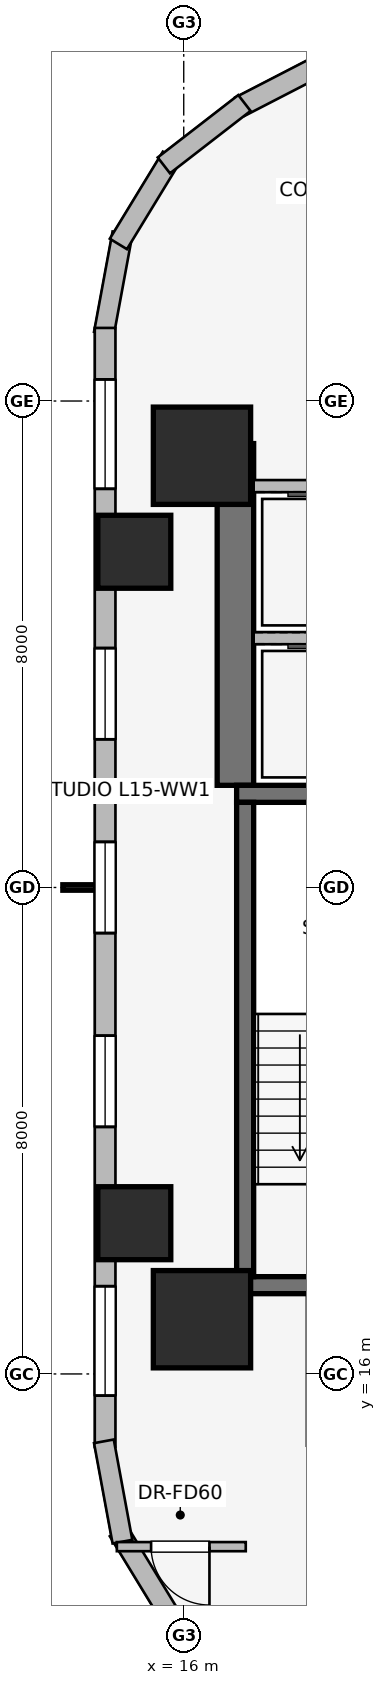
"""IFC4 building model, lengths in metres.
Left out: names, types, materials, properties, quantities, classifications, styles, units other than length and angle.
Written with IfcOpenShell. Run it as: python <this file> out.ifc"""

import sys

from ifc_helpers import new_model, si_unit, direction, frame, frame_2d, origin, origin_2d, place, context, subcontext, project, spatial, rectangle, extrude, element, fill, save


model = new_model("IFC4")
c1 = context("Model", 3, precision=1e-05, world=origin(), true_north=direction((0.0, 1.0)))
c2 = subcontext(c1, "Body", "Model", "MODEL_VIEW")
j1 = project(units=[si_unit("LENGTHUNIT", "METRE"), si_unit("PLANEANGLEUNIT", "RADIAN")], contexts=[c1])
p1 = place(None, origin())
s1 = spatial("IfcSite", under=j1, at=p1, CompositionType="ELEMENT")
p2 = place(p1, origin())
s2 = spatial("IfcBuilding", under=s1, at=p2, CompositionType="ELEMENT")
p3 = place(p2, frame((0.0, 0.0, 59.85)))
s3 = spatial("IfcBuildingStorey", under=s2, at=p3, CompositionType="ELEMENT", Elevation=59.85)
p4 = place(p3, frame((16.85, 25.68, 0.0), z_axis=(0.0, 0.0, 1.0), x_axis=(0.0, 1.0, 0.0)))
e1 = element("IfcWall", 1, at=p4, inside=s3, PredefinedType="SHEAR", context=c2, shape_type="SweptSolid", body=[
    extrude(rectangle(XDim=5.62, YDim=0.6, at=frame_2d((2.81, 0.0))), origin(), (0.0, 0.0, 1.0), 3.65),
])
for number, where, z_axis, x_axis in (
    (2, (16.87, 17.46, 0.0), (0.0, 0.0, 1.0), (1.0, 0.0, 0.0)),
    (3, (20.63, 25.54, 0.0), (0.0, 0.0, 1.0), (-1.0, 0.0, 0.0)),
):
    element("IfcWall", number, at=place(p3, frame(where, z_axis=z_axis, x_axis=x_axis)), inside=s3, PredefinedType="SHEAR", context=c2, shape_type="SweptSolid", body=[
        extrude(rectangle(XDim=3.76, YDim=0.28, at=frame_2d((1.88, 0.0))), origin(), (0.0, 0.0, 1.0), 3.65),
    ])
p5 = place(p3, frame((17.01, 25.4, 0.0), z_axis=(0.0, 0.0, 1.0), x_axis=(0.0, -1.0, 0.0)))
e4 = element("IfcWall", 4, at=p5, inside=s3, PredefinedType="SHEAR", context=c2, shape_type="SweptSolid", body=[
    extrude(rectangle(XDim=7.8, YDim=0.28, at=frame_2d((3.9, 0.0))), origin(), (0.0, 0.0, 1.0), 3.65),
])
for number, where, z_axis, x_axis in (
    (5, (16.3, 16.9, 0.0), (0.0, 0.0, 1.0), (1.0, 0.0, 0.0)),
    (6, (16.3, 31.1, 0.0), (0.0, 0.0, 1.0), (1.0, 0.0, 0.0)),
):
    element("IfcColumn", number, at=place(p3, frame(where, z_axis=z_axis, x_axis=x_axis)), inside=s3, PredefinedType="COLUMN", context=c2, shape_type="SweptSolid", body=[
        extrude(rectangle(XDim=1.6, YDim=1.6, at=origin_2d()), origin(), (0.0, 0.0, 1.0), 3.65),
    ])
for number, where, z_axis, x_axis in (
    (7, (15.187, 29.521, 0.0), (0.0, 0.0, 1.0), (1.0, 0.0, 0.0)),
    (8, (15.187, 18.479, 0.0), (0.0, 0.0, 1.0), (1.0, 0.0, 0.0)),
):
    element("IfcColumn", number, at=place(p3, frame(where, z_axis=z_axis, x_axis=x_axis)), inside=s3, PredefinedType="COLUMN", context=c2, shape_type="SweptSolid", body=[
        extrude(rectangle(XDim=1.2, YDim=1.2, at=origin_2d()), origin(), (0.0, 0.0, 1.0), 3.65),
    ])
p6 = place(p3, frame((16.924, 36.841, 0.0), z_axis=(0.0, 0.0, 1.0), x_axis=(0.888634413993, 0.458616264721, 0.0)))
e9 = element("IfcWall", 9, at=p6, inside=s3, PredefinedType="STANDARD", context=c2, shape_type="SweptSolid", body=[
    extrude(rectangle(XDim=20.531, YDim=0.34, at=frame_2d((10.266, 0.0))), origin(), (0.0, 0.0, 1.0), 2.684),
])
p7 = place(p6, frame((2.161, 0.0, 0.75)))
e10 = element("IfcOpeningElement", 10, at=p7, cuts=e9, PredefinedType="OPENING", context=c2, shape_type="SweptSolid", body=[
    extrude(rectangle(XDim=1.05, YDim=1.4, at=frame_2d((0.525, 0.7))), frame((0.0, 0.18, 0.0), z_axis=(0.0, -1.0, 0.0), x_axis=(1.0, 0.0, 0.0)), (0.0, 0.0, 1.0), 0.36),
])
p8 = place(p6, frame((5.903, 0.0, 0.75)))
e11 = element("IfcOpeningElement", 11, at=p8, cuts=e9, PredefinedType="OPENING", context=c2, shape_type="SweptSolid", body=[
    extrude(rectangle(XDim=1.5, YDim=1.5, at=frame_2d((0.75, 0.75))), frame((0.0, 0.18, 0.0), z_axis=(0.0, -1.0, 0.0), x_axis=(1.0, 0.0, 0.0)), (0.0, 0.0, 1.0), 0.36),
])
p9 = place(p6, frame((9.516, 0.0, 0.75)))
e12 = element("IfcOpeningElement", 12, at=p9, cuts=e9, PredefinedType="OPENING", context=c2, shape_type="SweptSolid", body=[
    extrude(rectangle(XDim=1.5, YDim=1.5, at=frame_2d((0.75, 0.75))), frame((0.0, 0.18, 0.0), z_axis=(0.0, -1.0, 0.0), x_axis=(1.0, 0.0, 0.0)), (0.0, 0.0, 1.0), 0.36),
])
p10 = place(p6, frame((13.129, 0.0, 0.75)))
e13 = element("IfcOpeningElement", 13, at=p10, cuts=e9, PredefinedType="OPENING", context=c2, shape_type="SweptSolid", body=[
    extrude(rectangle(XDim=1.5, YDim=1.5, at=frame_2d((0.75, 0.75))), frame((0.0, 0.18, 0.0), z_axis=(0.0, -1.0, 0.0), x_axis=(1.0, 0.0, 0.0)), (0.0, 0.0, 1.0), 0.36),
])
p11 = place(p6, frame((17.476, 0.0, 0.75)))
e14 = element("IfcOpeningElement", 14, at=p11, cuts=e9, PredefinedType="OPENING", context=c2, shape_type="SweptSolid", body=[
    extrude(rectangle(XDim=1.05, YDim=1.4, at=frame_2d((0.525, 0.7))), frame((0.0, 0.18, 0.0), z_axis=(0.0, -1.0, 0.0), x_axis=(1.0, 0.0, 0.0)), (0.0, 0.0, 1.0), 0.36),
])
p12 = place(p3, frame((14.687, 33.108, 0.0), z_axis=(0.0, 0.0, 1.0), x_axis=(0.181714143354, 0.983351397063, 0.0)))
e15 = element("IfcWall", 15, at=p12, inside=s3, PredefinedType="STANDARD", context=c2, shape_type="SweptSolid", body=[
    extrude(rectangle(XDim=1.678, YDim=0.33, at=frame_2d((0.839, 0.0))), origin(), (0.0, 0.0, 1.0), 3.39),
])
p13 = place(p3, frame((14.925, 34.583, 0.0), z_axis=(0.0, 0.0, 1.0), x_axis=(0.520584129191, 0.853810379671, 0.0)))
e16 = element("IfcWall", 16, at=p13, inside=s3, PredefinedType="STANDARD", context=c2, shape_type="SweptSolid", body=[
    extrude(rectangle(XDim=1.677, YDim=0.33, at=frame_2d((0.838, 0.0))), origin(), (0.0, 0.0, 1.0), 3.39),
])
p14 = place(p3, frame((15.673, 35.875, 0.0), z_axis=(0.0, 0.0, 1.0), x_axis=(0.790691856293, 0.61221433207, 0.0)))
e17 = element("IfcWall", 17, at=p14, inside=s3, PredefinedType="STANDARD", context=c2, shape_type="SweptSolid", body=[
    extrude(rectangle(XDim=1.676, YDim=0.33, at=frame_2d((0.838, 0.0))), origin(), (0.0, 0.0, 1.0), 3.39),
])
p15 = place(p3, frame((14.707, 14.798, 0.0), z_axis=(0.0, 0.0, 1.0), x_axis=(0.0, 1.0, 0.0)))
e18 = element("IfcWall", 18, at=p15, inside=s3, PredefinedType="STANDARD", context=c2, shape_type="SweptSolid", body=[
    extrude(rectangle(XDim=18.404, YDim=0.34, at=frame_2d((9.202, 0.0))), origin(), (0.0, 0.0, 1.0), 2.684),
])
p16 = place(p15, frame((0.845, 0.0, 0.75)))
e19 = element("IfcOpeningElement", 19, at=p16, cuts=e18, PredefinedType="OPENING", context=c2, shape_type="SweptSolid", body=[
    extrude(rectangle(XDim=1.8, YDim=1.5, at=frame_2d((0.9, 0.75))), frame((0.0, 0.18, 0.0), z_axis=(0.0, -1.0, 0.0), x_axis=(1.0, 0.0, 0.0)), (0.0, 0.0, 1.0), 0.36),
])
p17 = place(p15, frame((5.265, 0.0, 0.75)))
e20 = element("IfcOpeningElement", 20, at=p17, cuts=e18, PredefinedType="OPENING", context=c2, shape_type="SweptSolid", body=[
    extrude(rectangle(XDim=1.5, YDim=1.5, at=frame_2d((0.75, 0.75))), frame((0.0, 0.18, 0.0), z_axis=(0.0, -1.0, 0.0), x_axis=(1.0, 0.0, 0.0)), (0.0, 0.0, 1.0), 0.36),
])
p18 = place(p15, frame((8.452, 0.0, 0.75)))
e21 = element("IfcOpeningElement", 21, at=p18, cuts=e18, PredefinedType="OPENING", context=c2, shape_type="SweptSolid", body=[
    extrude(rectangle(XDim=1.5, YDim=1.5, at=frame_2d((0.75, 0.75))), frame((0.0, 0.18, 0.0), z_axis=(0.0, -1.0, 0.0), x_axis=(1.0, 0.0, 0.0)), (0.0, 0.0, 1.0), 0.36),
])
p19 = place(p15, frame((11.639, 0.0, 0.75)))
e22 = element("IfcOpeningElement", 22, at=p19, cuts=e18, PredefinedType="OPENING", context=c2, shape_type="SweptSolid", body=[
    extrude(rectangle(XDim=1.5, YDim=1.5, at=frame_2d((0.75, 0.75))), frame((0.0, 0.18, 0.0), z_axis=(0.0, -1.0, 0.0), x_axis=(1.0, 0.0, 0.0)), (0.0, 0.0, 1.0), 0.36),
])
p20 = place(p15, frame((15.758, 0.0, 0.75)))
e23 = element("IfcOpeningElement", 23, at=p20, cuts=e18, PredefinedType="OPENING", context=c2, shape_type="SweptSolid", body=[
    extrude(rectangle(XDim=1.8, YDim=1.5, at=frame_2d((0.9, 0.75))), frame((0.0, 0.18, 0.0), z_axis=(0.0, -1.0, 0.0), x_axis=(1.0, 0.0, 0.0)), (0.0, 0.0, 1.0), 0.36),
])
p21 = place(p3, frame((16.998, 11.099, 0.0), z_axis=(0.0, 0.0, 1.0), x_axis=(-0.790691856293, 0.61221433207, 0.0)))
e24 = element("IfcWall", 24, at=p21, inside=s3, PredefinedType="STANDARD", context=c2, shape_type="SweptSolid", body=[
    extrude(rectangle(XDim=1.676, YDim=0.33, at=frame_2d((0.838, 0.0))), origin(), (0.0, 0.0, 1.0), 3.39),
])
p22 = place(p3, frame((15.798, 11.985, 0.0), z_axis=(0.0, 0.0, 1.0), x_axis=(-0.520584129191, 0.853810379671, 0.0)))
e25 = element("IfcWall", 25, at=p22, inside=s3, PredefinedType="STANDARD", context=c2, shape_type="SweptSolid", body=[
    extrude(rectangle(XDim=1.677, YDim=0.33, at=frame_2d((0.838, 0.0))), origin(), (0.0, 0.0, 1.0), 3.39),
])
p23 = place(p3, frame((14.992, 13.242, 0.0), z_axis=(0.0, 0.0, 1.0), x_axis=(-0.181714143354, 0.983351397063, 0.0)))
e26 = element("IfcWall", 26, at=p23, inside=s3, PredefinedType="STANDARD", context=c2, shape_type="SweptSolid", body=[
    extrude(rectangle(XDim=1.678, YDim=0.33, at=frame_2d((0.839, 0.0))), origin(), (0.0, 0.0, 1.0), 3.39),
])
p24 = place(p3, frame((17.15, 28.1, 0.0), z_axis=(0.0, 0.0, 1.0), x_axis=(1.0, 0.0, 0.0)))
e27 = element("IfcWall", 27, at=p24, inside=s3, PredefinedType="PARTITIONING", context=c2, shape_type="SweptSolid", body=[
    extrude(rectangle(XDim=2.5, YDim=0.2, at=frame_2d((1.25, 0.0))), origin(), (0.0, 0.0, 1.0), 3.39),
])
p25 = place(p3, frame((19.65, 30.6, 0.0), z_axis=(0.0, 0.0, 1.0), x_axis=(-1.0, 0.0, 0.0)))
e28 = element("IfcWall", 28, at=p25, inside=s3, PredefinedType="PARTITIONING", context=c2, shape_type="SweptSolid", body=[
    extrude(rectangle(XDim=2.5, YDim=0.2, at=frame_2d((1.25, 0.0))), origin(), (0.0, 0.0, 1.0), 2.29),
])
p26 = place(p3, frame((17.02, 13.16, 0.0), z_axis=(0.0, 0.0, 1.0), x_axis=(-1.0, 0.0, 0.0)))
e29 = element("IfcWall", 29, at=p26, inside=s3, PredefinedType="PARTITIONING", context=c2, shape_type="SweptSolid", body=[
    extrude(rectangle(XDim=2.12, YDim=0.15, at=frame_2d((1.06, 0.0))), origin(), (0.0, 0.0, 1.0), 3.39),
])
p27 = place(p26, frame((0.597, 0.0, 0.0)))
e30 = element("IfcOpeningElement", 30, at=p27, cuts=e29, PredefinedType="OPENING", context=c2, shape_type="SweptSolid", body=[
    extrude(rectangle(XDim=0.96, YDim=2.0, at=frame_2d((0.48, 1.0))), frame((0.0, 0.085, 0.0), z_axis=(0.0, -1.0, 0.0), x_axis=(1.0, 0.0, 0.0)), (0.0, 0.0, 1.0), 0.17),
])
p28 = place(p16, origin())
e31 = element("IfcWindow", 31, at=p28, inside=s3, PartitioningType="SINGLE_PANEL", PredefinedType="WINDOW", context=c2, shape_type="SweptSolid", body=[
    extrude(rectangle(XDim=1.8, YDim=1.5, at=frame_2d((0.9, 0.75))), frame((0.0, 0.03, 0.0), z_axis=(0.0, -1.0, 0.0), x_axis=(1.0, 0.0, 0.0)), (0.0, 0.0, 1.0), 0.06),
])
fill(e19, e31)
p29 = place(p17, origin())
e32 = element("IfcWindow", 32, at=p29, inside=s3, PartitioningType="SINGLE_PANEL", PredefinedType="WINDOW", context=c2, shape_type="SweptSolid", body=[
    extrude(rectangle(XDim=1.5, YDim=1.5, at=frame_2d((0.75, 0.75))), frame((0.0, 0.03, 0.0), z_axis=(0.0, -1.0, 0.0), x_axis=(1.0, 0.0, 0.0)), (0.0, 0.0, 1.0), 0.06),
])
fill(e20, e32)
p30 = place(p18, origin())
e33 = element("IfcWindow", 33, at=p30, inside=s3, PartitioningType="SINGLE_PANEL", PredefinedType="WINDOW", context=c2, shape_type="SweptSolid", body=[
    extrude(rectangle(XDim=1.5, YDim=1.5, at=frame_2d((0.75, 0.75))), frame((0.0, 0.03, 0.0), z_axis=(0.0, -1.0, 0.0), x_axis=(1.0, 0.0, 0.0)), (0.0, 0.0, 1.0), 0.06),
])
fill(e21, e33)
p31 = place(p19, origin())
e34 = element("IfcWindow", 34, at=p31, inside=s3, PartitioningType="SINGLE_PANEL", PredefinedType="WINDOW", context=c2, shape_type="SweptSolid", body=[
    extrude(rectangle(XDim=1.5, YDim=1.5, at=frame_2d((0.75, 0.75))), frame((0.0, 0.03, 0.0), z_axis=(0.0, -1.0, 0.0), x_axis=(1.0, 0.0, 0.0)), (0.0, 0.0, 1.0), 0.06),
])
fill(e22, e34)
p32 = place(p20, origin())
e35 = element("IfcWindow", 35, at=p32, inside=s3, PartitioningType="SINGLE_PANEL", PredefinedType="WINDOW", context=c2, shape_type="SweptSolid", body=[
    extrude(rectangle(XDim=1.8, YDim=1.5, at=frame_2d((0.9, 0.75))), frame((0.0, 0.03, 0.0), z_axis=(0.0, -1.0, 0.0), x_axis=(1.0, 0.0, 0.0)), (0.0, 0.0, 1.0), 0.06),
])
fill(e23, e35)
p33 = place(p27, origin())
e36 = element("IfcDoor", 36, at=p33, inside=s3, OperationType="SINGLE_SWING_LEFT", PredefinedType="DOOR", context=c2, shape_type="SweptSolid", body=[
    extrude(rectangle(XDim=0.96, YDim=2.0, at=frame_2d((0.48, 1.0))), frame((0.0, 0.025, 0.0), z_axis=(0.0, -1.0, 0.0), x_axis=(1.0, 0.0, 0.0)), (0.0, 0.0, 1.0), 0.05),
])
fill(e30, e36)
save(model, sys.argv[1])
